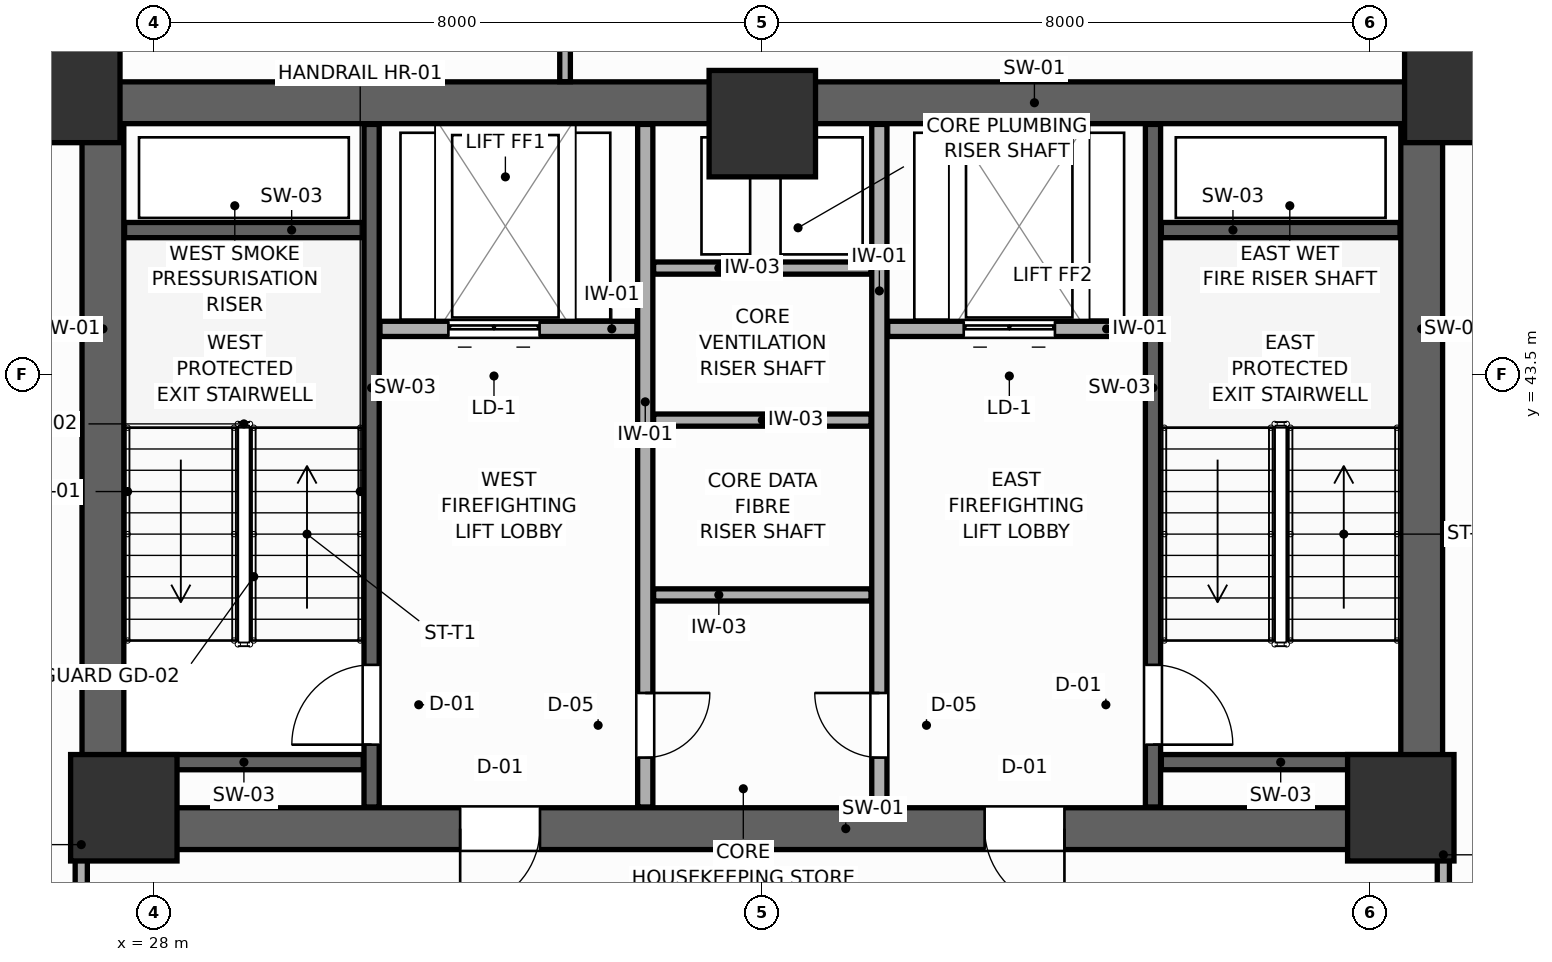
"""IFC4 building model, lengths in metres.
Left out: names, types, materials, properties, quantities, classifications, styles, units other than length and angle.
Written with IfcOpenShell. Run it as: python <this file> out.ifc"""

import sys

from ifc_helpers import new_model, si_unit, direction, frame, frame_2d, origin, origin_2d, place, context, subcontext, project, spatial, rectangle, extrude, source, transform, mapped, element, fill, save


model = new_model("IFC4")
c1 = context("Model", 3, precision=1e-05, world=origin(), true_north=direction((0.0, 1.0)))
c2 = subcontext(c1, "Body", "Model", "MODEL_VIEW")
j1 = project(units=[si_unit("LENGTHUNIT", "METRE"), si_unit("PLANEANGLEUNIT", "RADIAN")], contexts=[c1])
p1 = place(None, origin())
s1 = spatial("IfcSite", under=j1, at=p1, CompositionType="ELEMENT")
p2 = place(p1, origin())
s2 = spatial("IfcBuilding", under=s1, at=p2, CompositionType="ELEMENT")
p3 = place(p2, frame((0.0, 0.0, 24.0)))
s3 = spatial("IfcBuildingStorey", under=s2, at=p3, CompositionType="ELEMENT", Elevation=24.0)
p4 = place(p3, frame((27.05, 47.075, 0.0), z_axis=(0.0, 0.0, 1.0), x_axis=(1.0, 0.0, 0.0)))
e1 = element("IfcWall", 1, at=p4, inside=s3, PredefinedType="SHEAR", context=c2, shape_type="SweptSolid", body=[
    extrude(rectangle(XDim=17.9, YDim=0.55, at=frame_2d((8.95, 0.0))), origin(), (0.0, 0.0, 1.0), 3.9),
])
p5 = place(p3, frame((27.05, 37.525, 0.0), z_axis=(0.0, 0.0, 1.0), x_axis=(1.0, 0.0, 0.0)))
e2 = element("IfcWall", 2, at=p5, inside=s3, PredefinedType="SHEAR", context=c2, shape_type="SweptSolid", body=[
    extrude(rectangle(XDim=17.9, YDim=0.55, at=frame_2d((8.95, 0.0))), origin(), (0.0, 0.0, 1.0), 3.9),
])
p6 = place(p5, frame((4.975, 0.0, 0.0)))
e3 = element("IfcOpeningElement", 3, at=p6, cuts=e2, PredefinedType="OPENING", context=c2, shape_type="SweptSolid", body=[
    extrude(rectangle(XDim=1.05, YDim=2.1, at=frame_2d((0.525, 1.05))), frame((0.0, 0.285, 0.0), z_axis=(0.0, -1.0, 0.0), x_axis=(1.0, 0.0, 0.0)), (0.0, 0.0, 1.0), 0.57),
])
p7 = place(p5, frame((11.875, 0.0, 0.0)))
e4 = element("IfcOpeningElement", 4, at=p7, cuts=e2, PredefinedType="OPENING", context=c2, shape_type="SweptSolid", body=[
    extrude(rectangle(XDim=1.05, YDim=2.1, at=frame_2d((0.525, 1.05))), frame((0.0, 0.285, 0.0), z_axis=(0.0, -1.0, 0.0), x_axis=(1.0, 0.0, 0.0)), (0.0, 0.0, 1.0), 0.57),
])
for number, where, z_axis, x_axis in (
    (5, (27.325, 37.8, 0.0), (0.0, 0.0, 1.0), (0.0, 1.0, 0.0)),
    (6, (44.675, 37.8, 0.0), (0.0, 0.0, 1.0), (0.0, 1.0, 0.0)),
):
    element("IfcWall", number, at=place(p3, frame(where, z_axis=z_axis, x_axis=x_axis)), inside=s3, PredefinedType="SHEAR", context=c2, shape_type="SweptSolid", body=[
        extrude(rectangle(XDim=9.0, YDim=0.55, at=frame_2d((4.5, 0.0))), origin(), (0.0, 0.0, 1.0), 3.9),
    ])
m1 = source(origin(), c2, "Body", "SweptSolid", [
    extrude(rectangle(XDim=1.4, YDim=1.4, at=origin_2d()), origin(), (0.0, 0.0, 1.0), 3.9),
])
for number, where, z_axis, x_axis in (
    (7, (26.85, 47.25, 0.0), (0.0, 0.0, 1.0), (1.0, 0.0, 0.0)),
    (8, (45.15, 47.25, 0.0), (0.0, 0.0, 1.0), (1.0, 0.0, 0.0)),
    (9, (27.6, 37.8, 0.0), (0.0, 0.0, 1.0), (1.0, 0.0, 0.0)),
    (10, (44.4, 37.8, 0.0), (0.0, 0.0, 1.0), (1.0, 0.0, 0.0)),
    (11, (36.0, 46.8, 0.0), (0.0, 0.0, 1.0), (1.0, 0.0, 0.0)),
):
    element("IfcColumn", number, at=place(p3, frame(where, z_axis=z_axis, x_axis=x_axis)), inside=s3, PredefinedType="COLUMN", context=c2, shape_type="MappedRepresentation", body=[
        mapped(m1, transform((0.0, 0.0, 0.0), scale=1.0)),
    ])
p8 = place(p3, frame((30.86, 37.81, 0.0), z_axis=(0.0, 0.0, 1.0), x_axis=(0.0, 1.0, 0.0)))
e12 = element("IfcWall", 12, at=p8, inside=s3, PredefinedType="SHEAR", context=c2, shape_type="SweptSolid", body=[
    extrude(rectangle(XDim=8.98, YDim=0.2, at=frame_2d((4.49, 0.0))), origin(), (0.0, 0.0, 1.0), 3.9),
])
p9 = place(p8, frame((0.82, 0.0, 0.0)))
e13 = element("IfcOpeningElement", 13, at=p9, cuts=e12, PredefinedType="OPENING", context=c2, shape_type="SweptSolid", body=[
    extrude(rectangle(XDim=1.05, YDim=2.1, at=frame_2d((0.525, 1.05))), frame((0.0, 0.11, 0.0), z_axis=(0.0, -1.0, 0.0), x_axis=(1.0, 0.0, 0.0)), (0.0, 0.0, 1.0), 0.22),
])
for number, where, z_axis, x_axis in (
    (14, (27.61, 45.4, 0.0), (0.0, 0.0, 1.0), (1.0, 0.0, 0.0)),
    (15, (27.61, 38.4, 0.0), (0.0, 0.0, 1.0), (1.0, 0.0, 0.0)),
):
    element("IfcWall", number, at=place(p3, frame(where, z_axis=z_axis, x_axis=x_axis)), inside=s3, PredefinedType="SHEAR", context=c2, shape_type="SweptSolid", body=[
        extrude(rectangle(XDim=3.14, YDim=0.2, at=frame_2d((1.57, 0.0))), origin(), (0.0, 0.0, 1.0), 3.9),
    ])
p10 = place(p3, frame((41.14, 37.81, 0.0), z_axis=(0.0, 0.0, 1.0), x_axis=(0.0, 1.0, 0.0)))
e16 = element("IfcWall", 16, at=p10, inside=s3, PredefinedType="SHEAR", context=c2, shape_type="SweptSolid", body=[
    extrude(rectangle(XDim=8.98, YDim=0.2, at=frame_2d((4.49, 0.0))), origin(), (0.0, 0.0, 1.0), 3.9),
])
p11 = place(p10, frame((0.82, 0.0, 0.0)))
e17 = element("IfcOpeningElement", 17, at=p11, cuts=e16, PredefinedType="OPENING", context=c2, shape_type="SweptSolid", body=[
    extrude(rectangle(XDim=1.05, YDim=2.1, at=frame_2d((0.525, 1.05))), frame((0.0, 0.11, 0.0), z_axis=(0.0, -1.0, 0.0), x_axis=(1.0, 0.0, 0.0)), (0.0, 0.0, 1.0), 0.22),
])
for number, where, z_axis, x_axis in (
    (18, (41.25, 45.4, 0.0), (0.0, 0.0, 1.0), (1.0, 0.0, 0.0)),
    (19, (41.25, 38.4, 0.0), (0.0, 0.0, 1.0), (1.0, 0.0, 0.0)),
):
    element("IfcWall", number, at=place(p3, frame(where, z_axis=z_axis, x_axis=x_axis)), inside=s3, PredefinedType="SHEAR", context=c2, shape_type="SweptSolid", body=[
        extrude(rectangle(XDim=3.14, YDim=0.2, at=frame_2d((1.57, 0.0))), origin(), (0.0, 0.0, 1.0), 3.9),
    ])
p12 = place(p3, frame((30.97, 44.1, 0.0), z_axis=(0.0, 0.0, 1.0), x_axis=(1.0, 0.0, 0.0)))
e20 = element("IfcWall", 20, at=p12, inside=s3, PredefinedType="PARTITIONING", context=c2, shape_type="SweptSolid", body=[
    extrude(rectangle(XDim=3.38, YDim=0.2, at=frame_2d((1.69, 0.0))), origin(), (0.0, 0.0, 1.0), 3.68),
])
p13 = place(p12, frame((0.9, 0.0, 0.0)))
e21 = element("IfcOpeningElement", 21, at=p13, cuts=e20, PredefinedType="OPENING", context=c2, shape_type="SweptSolid", body=[
    extrude(rectangle(XDim=1.2, YDim=2.1, at=frame_2d((0.6, 1.05))), frame((0.0, 0.11, 0.0), z_axis=(0.0, -1.0, 0.0), x_axis=(1.0, 0.0, 0.0)), (0.0, 0.0, 1.0), 0.22),
])
p14 = place(p3, frame((37.65, 44.1, 0.0), z_axis=(0.0, 0.0, 1.0), x_axis=(1.0, 0.0, 0.0)))
e22 = element("IfcWall", 22, at=p14, inside=s3, PredefinedType="PARTITIONING", context=c2, shape_type="SweptSolid", body=[
    extrude(rectangle(XDim=3.38, YDim=0.2, at=frame_2d((1.69, 0.0))), origin(), (0.0, 0.0, 1.0), 3.68),
])
p15 = place(p14, frame((1.0, 0.0, 0.0)))
e23 = element("IfcOpeningElement", 23, at=p15, cuts=e22, PredefinedType="OPENING", context=c2, shape_type="SweptSolid", body=[
    extrude(rectangle(XDim=1.2, YDim=2.1, at=frame_2d((0.6, 1.05))), frame((0.0, 0.11, 0.0), z_axis=(0.0, -1.0, 0.0), x_axis=(1.0, 0.0, 0.0)), (0.0, 0.0, 1.0), 0.22),
])
p16 = place(p3, frame((34.46, 37.81, 0.0), z_axis=(0.0, 0.0, 1.0), x_axis=(0.0, 1.0, 0.0)))
e24 = element("IfcWall", 24, at=p16, inside=s3, PredefinedType="PARTITIONING", context=c2, shape_type="SweptSolid", body=[
    extrude(rectangle(XDim=8.98, YDim=0.2, at=frame_2d((4.49, 0.0))), origin(), (0.0, 0.0, 1.0), 3.68),
])
p17 = place(p16, frame((0.65, 0.0, 0.0)))
e25 = element("IfcOpeningElement", 25, at=p17, cuts=e24, PredefinedType="OPENING", context=c2, shape_type="SweptSolid", body=[
    extrude(rectangle(XDim=0.85, YDim=2.05, at=frame_2d((0.425, 1.025))), frame((0.0, 0.11, 0.0), z_axis=(0.0, -1.0, 0.0), x_axis=(1.0, 0.0, 0.0)), (0.0, 0.0, 1.0), 0.22),
])
p18 = place(p3, frame((37.54, 37.81, 0.0), z_axis=(0.0, 0.0, 1.0), x_axis=(0.0, 1.0, 0.0)))
e26 = element("IfcWall", 26, at=p18, inside=s3, PredefinedType="PARTITIONING", context=c2, shape_type="SweptSolid", body=[
    extrude(rectangle(XDim=8.98, YDim=0.2, at=frame_2d((4.49, 0.0))), origin(), (0.0, 0.0, 1.0), 3.68),
])
p19 = place(p18, frame((0.65, 0.0, 0.0)))
e27 = element("IfcOpeningElement", 27, at=p19, cuts=e26, PredefinedType="OPENING", context=c2, shape_type="SweptSolid", body=[
    extrude(rectangle(XDim=0.85, YDim=2.05, at=frame_2d((0.425, 1.025))), frame((0.0, 0.11, 0.0), z_axis=(0.0, -1.0, 0.0), x_axis=(1.0, 0.0, 0.0)), (0.0, 0.0, 1.0), 0.22),
])
for number, where, z_axis, x_axis in (
    (28, (34.57, 40.6, 0.0), (0.0, 0.0, 1.0), (1.0, 0.0, 0.0)),
    (29, (34.57, 42.9, 0.0), (0.0, 0.0, 1.0), (1.0, 0.0, 0.0)),
    (30, (34.57, 44.9, 0.0), (0.0, 0.0, 1.0), (1.0, 0.0, 0.0)),
):
    element("IfcWall", number, at=place(p3, frame(where, z_axis=z_axis, x_axis=x_axis)), inside=s3, PredefinedType="PARTITIONING", context=c2, shape_type="SweptSolid", body=[
        extrude(rectangle(XDim=2.86, YDim=0.16, at=frame_2d((1.43, 0.0))), origin(), (0.0, 0.0, 1.0), 3.68),
    ])
p20 = place(p3, frame((27.04, 35.0, 0.0), z_axis=(0.0, 0.0, 1.0), x_axis=(0.0, 1.0, 0.0)))
e31 = element("IfcWall", 31, at=p20, inside=s3, PredefinedType="PARTITIONING", context=c2, shape_type="SweptSolid", body=[
    extrude(rectangle(XDim=2.65, YDim=0.16, at=frame_2d((1.325, 0.0))), origin(), (0.0, 0.0, 1.0), 3.68),
])
p21 = place(p20, frame((0.75, 0.0, 0.0)))
e32 = element("IfcOpeningElement", 32, at=p21, cuts=e31, PredefinedType="OPENING", context=c2, shape_type="SweptSolid", body=[
    extrude(rectangle(XDim=1.05, YDim=2.1, at=frame_2d((0.525, 1.05))), frame((0.0, 0.09, 0.0), z_axis=(0.0, -1.0, 0.0), x_axis=(1.0, 0.0, 0.0)), (0.0, 0.0, 1.0), 0.18),
])
p22 = place(p3, frame((44.96, 35.0, 0.0), z_axis=(0.0, 0.0, 1.0), x_axis=(0.0, 1.0, 0.0)))
e33 = element("IfcWall", 33, at=p22, inside=s3, PredefinedType="PARTITIONING", context=c2, shape_type="SweptSolid", body=[
    extrude(rectangle(XDim=2.65, YDim=0.16, at=frame_2d((1.325, 0.0))), origin(), (0.0, 0.0, 1.0), 3.68),
])
p23 = place(p22, frame((0.75, 0.0, 0.0)))
e34 = element("IfcOpeningElement", 34, at=p23, cuts=e33, PredefinedType="OPENING", context=c2, shape_type="SweptSolid", body=[
    extrude(rectangle(XDim=1.05, YDim=2.1, at=frame_2d((0.525, 1.05))), frame((0.0, 0.09, 0.0), z_axis=(0.0, -1.0, 0.0), x_axis=(1.0, 0.0, 0.0)), (0.0, 0.0, 1.0), 0.18),
])
p24 = place(p3, frame((27.035, 47.34, 0.0), z_axis=(0.0, 0.0, 1.0), x_axis=(0.0, 1.0, 0.0)))
e35 = element("IfcWall", 35, at=p24, inside=s3, PredefinedType="PARTITIONING", context=c2, shape_type="SweptSolid", body=[
    extrude(rectangle(XDim=10.41, YDim=0.16, at=frame_2d((5.205, 0.0))), origin(), (0.0, 0.0, 1.0), 3.18),
])
p25 = place(p24, frame((4.73, 0.0, 0.0)))
e36 = element("IfcOpeningElement", 36, at=p25, cuts=e35, PredefinedType="OPENING", context=c2, shape_type="SweptSolid", body=[
    extrude(rectangle(XDim=0.95, YDim=2.05, at=frame_2d((0.475, 1.025))), frame((0.0, 0.09, 0.0), z_axis=(0.0, -1.0, 0.0), x_axis=(1.0, 0.0, 0.0)), (0.0, 0.0, 1.0), 0.18),
])
p26 = place(p3, frame((44.965, 47.34, 0.0), z_axis=(0.0, 0.0, 1.0), x_axis=(0.0, 1.0, 0.0)))
e37 = element("IfcWall", 37, at=p26, inside=s3, PredefinedType="PARTITIONING", context=c2, shape_type="SweptSolid", body=[
    extrude(rectangle(XDim=10.41, YDim=0.16, at=frame_2d((5.205, 0.0))), origin(), (0.0, 0.0, 1.0), 3.18),
])
p27 = place(p3, frame((33.405, 47.352, 0.0), z_axis=(0.0, 0.0, 1.0), x_axis=(0.0, 1.0, 0.0)))
e38 = element("IfcWall", 38, at=p27, inside=s3, PredefinedType="PARTITIONING", context=c2, shape_type="SweptSolid", body=[
    extrude(rectangle(XDim=10.545, YDim=0.14, at=frame_2d((5.272, 0.0))), origin(), (0.0, 0.0, 1.0), 3.68),
])
p28 = place(p27, frame((4.798, 0.0, 0.0)))
e39 = element("IfcOpeningElement", 39, at=p28, cuts=e38, PredefinedType="OPENING", context=c2, shape_type="SweptSolid", body=[
    extrude(rectangle(XDim=0.95, YDim=2.05, at=frame_2d((0.475, 1.025))), frame((0.0, 0.08, 0.0), z_axis=(0.0, -1.0, 0.0), x_axis=(1.0, 0.0, 0.0)), (0.0, 0.0, 1.0), 0.16),
])
p29 = place(p9, origin())
e40 = element("IfcDoor", 40, at=p29, inside=s3, OperationType="SINGLE_SWING_LEFT", PredefinedType="DOOR", context=c2, shape_type="SweptSolid", body=[
    extrude(rectangle(XDim=1.05, YDim=2.1, at=frame_2d((0.525, 1.05))), frame((0.0, 0.025, 0.0), z_axis=(0.0, -1.0, 0.0), x_axis=(1.0, 0.0, 0.0)), (0.0, 0.0, 1.0), 0.05),
])
fill(e13, e40)
p30 = place(p11, frame((1.05, 0.0, 0.0), z_axis=(0.0, 0.0, 1.0), x_axis=(-1.0, 0.0, 0.0)))
e41 = element("IfcDoor", 41, at=p30, inside=s3, OperationType="SINGLE_SWING_RIGHT", PredefinedType="DOOR", context=c2, shape_type="SweptSolid", body=[
    extrude(rectangle(XDim=1.05, YDim=2.1, at=frame_2d((0.525, 1.05))), frame((0.0, 0.025, 0.0), z_axis=(0.0, -1.0, 0.0), x_axis=(1.0, 0.0, 0.0)), (0.0, 0.0, 1.0), 0.05),
])
fill(e17, e41)
p31 = place(p13, origin())
e42 = element("IfcDoor", 42, at=p31, inside=s3, OperationType="DOUBLE_DOOR_SLIDING", PredefinedType="DOOR", context=c2, shape_type="SweptSolid", body=[
    extrude(rectangle(XDim=1.2, YDim=2.1, at=frame_2d((0.6, 1.05))), frame((0.0, 0.025, 0.0), z_axis=(0.0, -1.0, 0.0), x_axis=(1.0, 0.0, 0.0)), (0.0, 0.0, 1.0), 0.05),
])
fill(e21, e42)
p32 = place(p15, origin())
e43 = element("IfcDoor", 43, at=p32, inside=s3, OperationType="DOUBLE_DOOR_SLIDING", PredefinedType="DOOR", context=c2, shape_type="SweptSolid", body=[
    extrude(rectangle(XDim=1.2, YDim=2.1, at=frame_2d((0.6, 1.05))), frame((0.0, 0.025, 0.0), z_axis=(0.0, -1.0, 0.0), x_axis=(1.0, 0.0, 0.0)), (0.0, 0.0, 1.0), 0.05),
])
fill(e23, e43)
p33 = place(p17, frame((0.85, 0.0, 0.0), z_axis=(0.0, 0.0, 1.0), x_axis=(-1.0, 0.0, 0.0)))
e44 = element("IfcDoor", 44, at=p33, inside=s3, OperationType="SINGLE_SWING_LEFT", PredefinedType="DOOR", context=c2, shape_type="SweptSolid", body=[
    extrude(rectangle(XDim=0.85, YDim=2.05, at=frame_2d((0.425, 1.025))), frame((0.0, 0.025, 0.0), z_axis=(0.0, -1.0, 0.0), x_axis=(1.0, 0.0, 0.0)), (0.0, 0.0, 1.0), 0.05),
])
fill(e25, e44)
p34 = place(p19, origin())
e45 = element("IfcDoor", 45, at=p34, inside=s3, OperationType="SINGLE_SWING_RIGHT", PredefinedType="DOOR", context=c2, shape_type="SweptSolid", body=[
    extrude(rectangle(XDim=0.85, YDim=2.05, at=frame_2d((0.425, 1.025))), frame((0.0, 0.025, 0.0), z_axis=(0.0, -1.0, 0.0), x_axis=(1.0, 0.0, 0.0)), (0.0, 0.0, 1.0), 0.05),
])
fill(e27, e45)
p35 = place(p6, frame((1.05, 0.0, 0.0), z_axis=(0.0, 0.0, 1.0), x_axis=(-1.0, 0.0, 0.0)))
e46 = element("IfcDoor", 46, at=p35, inside=s3, OperationType="SINGLE_SWING_RIGHT", PredefinedType="DOOR", context=c2, shape_type="SweptSolid", body=[
    extrude(rectangle(XDim=1.05, YDim=2.1, at=frame_2d((0.525, 1.05))), frame((0.0, 0.025, 0.0), z_axis=(0.0, -1.0, 0.0), x_axis=(1.0, 0.0, 0.0)), (0.0, 0.0, 1.0), 0.05),
])
fill(e3, e46)
p36 = place(p7, frame((1.05, 0.0, 0.0), z_axis=(0.0, 0.0, 1.0), x_axis=(-1.0, 0.0, 0.0)))
e47 = element("IfcDoor", 47, at=p36, inside=s3, OperationType="SINGLE_SWING_LEFT", PredefinedType="DOOR", context=c2, shape_type="SweptSolid", body=[
    extrude(rectangle(XDim=1.05, YDim=2.1, at=frame_2d((0.525, 1.05))), frame((0.0, 0.025, 0.0), z_axis=(0.0, -1.0, 0.0), x_axis=(1.0, 0.0, 0.0)), (0.0, 0.0, 1.0), 0.05),
])
fill(e4, e47)
save(model, sys.argv[1])
